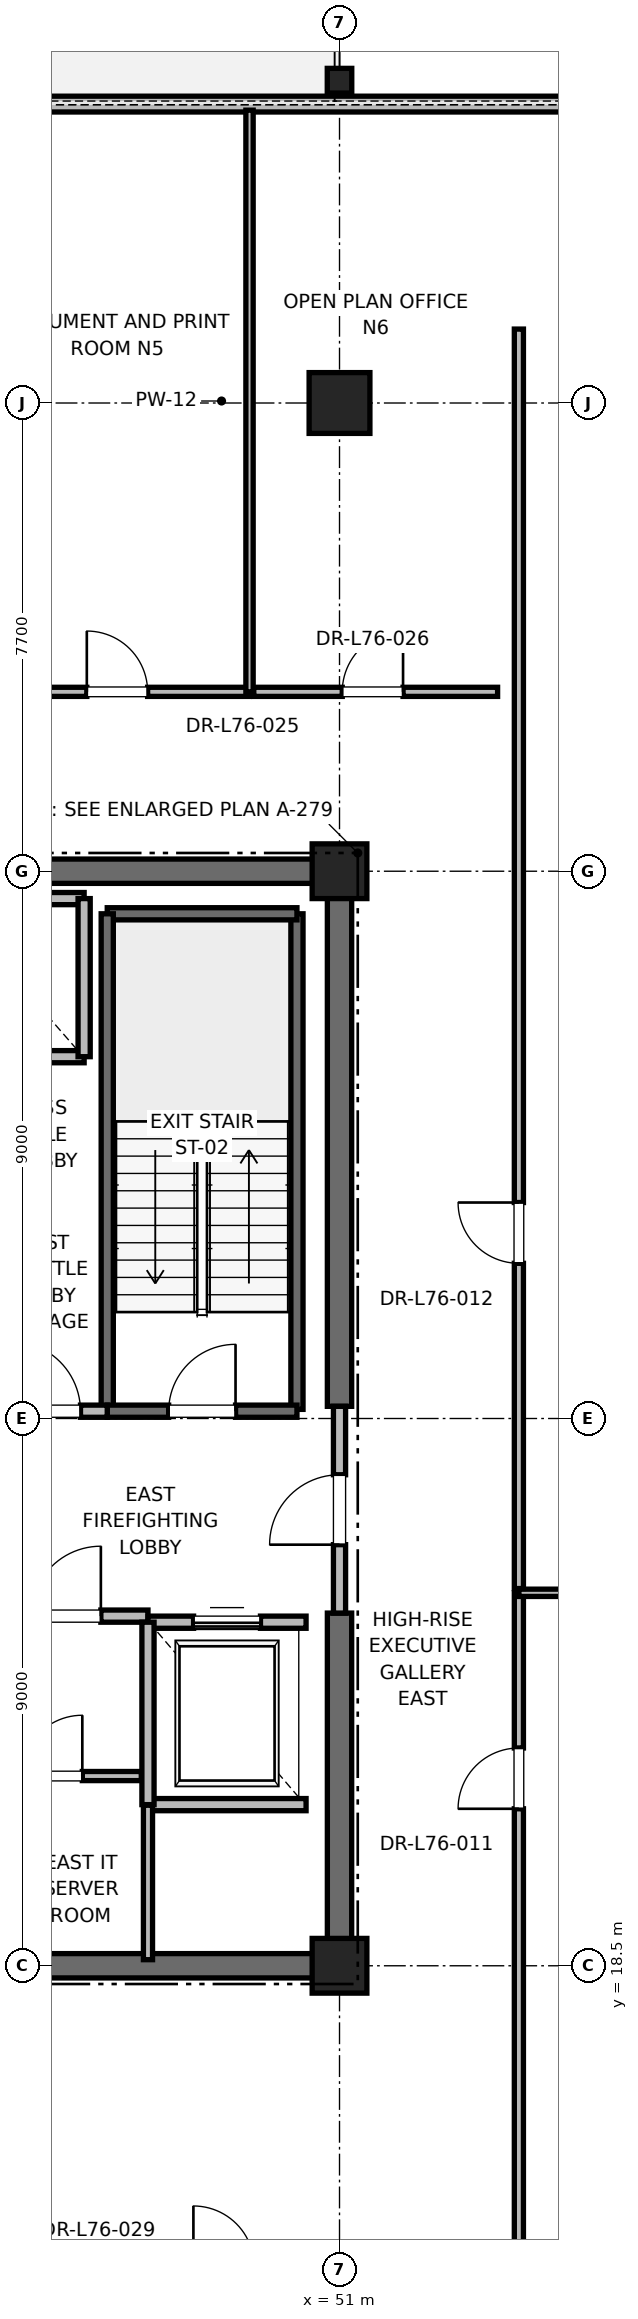
"""IFC4 building model, lengths in metres.
Left out: names, types, materials, properties, quantities, classifications, styles, units other than length and angle.
Written with IfcOpenShell. Run it as: python <this file> out.ifc"""

import sys

from ifc_helpers import new_model, si_unit, direction, frame, frame_2d, origin, origin_2d, place, context, subcontext, project, spatial, rectangle, i_section, extrude, element, fill, save


model = new_model("IFC4")
c1 = context("Model", 3, precision=1e-05, world=origin(), true_north=direction((0.0, 1.0)))
c2 = subcontext(c1, "Body", "Model", "MODEL_VIEW")
j1 = project(units=[si_unit("LENGTHUNIT", "METRE"), si_unit("PLANEANGLEUNIT", "RADIAN")], contexts=[c1])
p1 = place(None, origin())
s1 = spatial("IfcSite", under=j1, at=p1, CompositionType="ELEMENT")
p2 = place(p1, origin())
s2 = spatial("IfcBuilding", under=s1, at=p2, CompositionType="ELEMENT")
p3 = place(p2, frame((0.0, 0.0, 326.8)))
s3 = spatial("IfcBuildingStorey", under=s2, at=p3, CompositionType="ELEMENT", Elevation=326.8)
p4 = place(p3, frame((51.0, 44.2, 0.0), z_axis=(0.0, 0.0, 1.0), x_axis=(1.0, 0.0, 0.0)))
e1 = element("IfcColumn", 1, at=p4, inside=s3, PredefinedType="COLUMN", context=c2, shape_type="SweptSolid", body=[
    extrude(rectangle(XDim=1.0, YDim=1.0, at=origin_2d()), origin(), (0.0, 0.0, 1.0), 4.0),
])
p5 = place(p3, frame((51.0, 49.5, 0.0), z_axis=(0.0, 0.0, 1.0), x_axis=(1.0, 0.0, 0.0)))
e2 = element("IfcColumn", 2, at=p5, inside=s3, PredefinedType="COLUMN", context=c2, shape_type="SweptSolid", body=[
    extrude(i_section(OverallWidth=0.403, OverallDepth=0.406, WebThickness=0.027, FlangeThickness=0.043, FilletRadius=0.015, at=origin_2d()), origin(), (0.0, 0.0, 1.0), 4.0),
])
for number, where, z_axis, x_axis in (
    (3, (51.0, 18.5, 0.0), (0.0, 0.0, 1.0), (1.0, 0.0, 0.0)),
    (4, (51.0, 36.5, 0.0), (0.0, 0.0, 1.0), (1.0, 0.0, 0.0)),
):
    element("IfcColumn", number, at=place(p3, frame(where, z_axis=z_axis, x_axis=x_axis)), inside=s3, PredefinedType="PILASTER", context=c2, shape_type="SweptSolid", body=[
        extrude(rectangle(XDim=0.9, YDim=0.9, at=origin_2d()), origin(), (0.0, 0.0, 1.0), 4.0),
    ])
p6 = place(p3, frame((41.8, 18.5, 0.0), z_axis=(0.0, 0.0, 1.0), x_axis=(1.0, 0.0, 0.0)))
e5 = element("IfcWall", 5, at=p6, inside=s3, PredefinedType="SHEAR", context=c2, shape_type="SweptSolid", body=[
    extrude(rectangle(XDim=9.2, YDim=0.4, at=frame_2d((4.6, 0.0))), origin(), (0.0, 0.0, 1.0), 3.785),
])
for number, where, z_axis, x_axis in (
    (6, (45.2, 36.5, 0.0), (0.0, 0.0, 1.0), (1.0, 0.0, 0.0)),
    (7, (51.0, 18.5, 0.0), (0.0, 0.0, 1.0), (0.0, 1.0, 0.0)),
):
    element("IfcWall", number, at=place(p3, frame(where, z_axis=z_axis, x_axis=x_axis)), inside=s3, PredefinedType="SHEAR", context=c2, shape_type="SweptSolid", body=[
        extrude(rectangle(XDim=5.8, YDim=0.4, at=frame_2d((2.9, 0.0))), origin(), (0.0, 0.0, 1.0), 3.785),
    ])
p7 = place(p3, frame((51.0, 27.7, 0.0), z_axis=(0.0, 0.0, 1.0), x_axis=(0.0, 1.0, 0.0)))
e8 = element("IfcWall", 8, at=p7, inside=s3, PredefinedType="SHEAR", context=c2, shape_type="SweptSolid", body=[
    extrude(rectangle(XDim=8.8, YDim=0.4, at=frame_2d((4.4, 0.0))), origin(), (0.0, 0.0, 1.0), 3.785),
])
p8 = place(p3, frame((61.031, 49.116, 0.0), z_axis=(0.0, 0.0, 1.0), x_axis=(-1.0, 0.0, 0.0)))
e9 = element("IfcWall", 9, at=p8, inside=s3, PredefinedType="PARAPET", context=c2, shape_type="SweptSolid", body=[
    extrude(rectangle(XDim=42.063, YDim=0.26, at=frame_2d((21.031, 0.0))), origin(), (0.0, 0.0, 1.0), 3.196),
])
p9 = place(p8, frame((4.2, 0.0, 0.85)))
e10 = element("IfcOpeningElement", 10, at=p9, cuts=e9, PredefinedType="OPENING", context=c2, shape_type="SweptSolid", body=[
    extrude(rectangle(XDim=1.6, YDim=2.1, at=frame_2d((0.8, 1.05))), frame((0.0, 0.13, 0.0), z_axis=(0.0, -1.0, 0.0), x_axis=(1.0, 0.0, 0.0)), (0.0, 0.0, 1.0), 0.26),
])
p10 = place(p8, frame((20.431, 0.0, 0.0)))
e11 = element("IfcOpeningElement", 11, at=p10, cuts=e9, PredefinedType="OPENING", context=c2, shape_type="SweptSolid", body=[
    extrude(rectangle(XDim=1.2, YDim=2.2, at=frame_2d((0.6, 1.1))), frame((0.0, 0.13, 0.0), z_axis=(0.0, -1.0, 0.0), x_axis=(1.0, 0.0, 0.0)), (0.0, 0.0, 1.0), 0.26),
])
p11 = place(p8, frame((36.263, 0.0, 0.85)))
e12 = element("IfcOpeningElement", 12, at=p11, cuts=e9, PredefinedType="OPENING", context=c2, shape_type="SweptSolid", body=[
    extrude(rectangle(XDim=1.6, YDim=2.1, at=frame_2d((0.8, 1.05))), frame((0.0, 0.13, 0.0), z_axis=(0.0, -1.0, 0.0), x_axis=(1.0, 0.0, 0.0)), (0.0, 0.0, 1.0), 0.26),
])
p12 = place(p3, frame((50.3, 27.65, 0.0), z_axis=(0.0, 0.0, 1.0), x_axis=(0.0, 1.0, 0.0)))
e13 = element("IfcWall", 13, at=p12, inside=s3, PredefinedType="SOLIDWALL", context=c2, shape_type="SweptSolid", body=[
    extrude(rectangle(XDim=8.15, YDim=0.2, at=frame_2d((4.075, 0.0))), origin(), (0.0, 0.0, 1.0), 3.785),
])
p13 = place(p3, frame((47.18, 35.8, 0.0), z_axis=(0.0, 0.0, 1.0), x_axis=(1.0, 0.0, 0.0)))
e14 = element("IfcWall", 14, at=p13, inside=s3, PredefinedType="SOLIDWALL", context=c2, shape_type="SweptSolid", body=[
    extrude(rectangle(XDim=3.12, YDim=0.2, at=frame_2d((1.56, 0.0))), origin(), (0.0, 0.0, 1.0), 3.785),
])
p14 = place(p3, frame((47.18, 27.62, 0.0), z_axis=(0.0, 0.0, 1.0), x_axis=(0.0, 1.0, 0.0)))
e15 = element("IfcWall", 15, at=p14, inside=s3, PredefinedType="SOLIDWALL", context=c2, shape_type="SweptSolid", body=[
    extrude(rectangle(XDim=8.18, YDim=0.2, at=frame_2d((4.09, 0.0))), origin(), (0.0, 0.0, 1.0), 3.785),
])
p15 = place(p3, frame((47.18, 27.62, 0.0), z_axis=(0.0, 0.0, 1.0), x_axis=(1.0, 0.0, 0.0)))
e16 = element("IfcWall", 16, at=p15, inside=s3, PredefinedType="SOLIDWALL", context=c2, shape_type="SweptSolid", body=[
    extrude(rectangle(XDim=3.12, YDim=0.2, at=frame_2d((1.56, 0.0))), origin(), (0.0, 0.0, 1.0), 3.785),
])
p16 = place(p15, frame((1.01, 0.0, 0.0)))
e17 = element("IfcOpeningElement", 17, at=p16, cuts=e16, PredefinedType="OPENING", context=c2, shape_type="SweptSolid", body=[
    extrude(rectangle(XDim=1.1, YDim=2.15, at=frame_2d((0.55, 1.075))), frame((0.0, 0.1, 0.0), z_axis=(0.0, -1.0, 0.0), x_axis=(1.0, 0.0, 0.0)), (0.0, 0.0, 1.0), 0.2),
])
p17 = place(p3, frame((45.15, 24.25, 0.0), z_axis=(0.0, 0.0, 1.0), x_axis=(1.0, 0.0, 0.0)))
e18 = element("IfcWall", 18, at=p17, inside=s3, PredefinedType="PARTITIONING", context=c2, shape_type="SweptSolid", body=[
    extrude(rectangle(XDim=2.7, YDim=0.2, at=frame_2d((1.35, 0.0))), origin(), (0.0, 0.0, 1.0), 3.785),
])
p18 = place(p17, frame((0.775, 0.0, 0.0)))
e19 = element("IfcOpeningElement", 19, at=p18, cuts=e18, PredefinedType="OPENING", context=c2, shape_type="SweptSolid", body=[
    extrude(rectangle(XDim=1.15, YDim=2.2, at=frame_2d((0.575, 1.1))), frame((0.0, 0.1, 0.0), z_axis=(0.0, -1.0, 0.0), x_axis=(1.0, 0.0, 0.0)), (0.0, 0.0, 1.0), 0.2),
])
p19 = place(p3, frame((45.15, 27.62, 0.0), z_axis=(0.0, 0.0, 1.0), x_axis=(1.0, 0.0, 0.0)))
e20 = element("IfcWall", 20, at=p19, inside=s3, PredefinedType="PARTITIONING", context=c2, shape_type="SweptSolid", body=[
    extrude(rectangle(XDim=2.03, YDim=0.2, at=frame_2d((1.015, 0.0))), origin(), (0.0, 0.0, 1.0), 3.785),
])
p20 = place(p19, frame((0.44, 0.0, 0.0)))
e21 = element("IfcOpeningElement", 21, at=p20, cuts=e20, PredefinedType="OPENING", context=c2, shape_type="SweptSolid", body=[
    extrude(rectangle(XDim=1.15, YDim=2.2, at=frame_2d((0.575, 1.1))), frame((0.0, 0.1, 0.0), z_axis=(0.0, -1.0, 0.0), x_axis=(1.0, 0.0, 0.0)), (0.0, 0.0, 1.0), 0.2),
])
p21 = place(p3, frame((51.0, 24.3, 0.0), z_axis=(0.0, 0.0, 1.0), x_axis=(0.0, 1.0, 0.0)))
e22 = element("IfcWall", 22, at=p21, inside=s3, PredefinedType="PARTITIONING", context=c2, shape_type="SweptSolid", body=[
    extrude(rectangle(XDim=3.4, YDim=0.2, at=frame_2d((1.7, 0.0))), origin(), (0.0, 0.0, 1.0), 2.865),
])
p22 = place(p21, frame((1.125, 0.0, 0.0)))
e23 = element("IfcOpeningElement", 23, at=p22, cuts=e22, PredefinedType="OPENING", context=c2, shape_type="SweptSolid", body=[
    extrude(rectangle(XDim=1.15, YDim=2.2, at=frame_2d((0.575, 1.1))), frame((0.0, 0.1, 0.0), z_axis=(0.0, -1.0, 0.0), x_axis=(1.0, 0.0, 0.0)), (0.0, 0.0, 1.0), 0.2),
])
p23 = place(p3, frame((47.85, 21.15, 0.0), z_axis=(0.0, 0.0, 1.0), x_axis=(1.0, 0.0, 0.0)))
e24 = element("IfcWall", 24, at=p23, inside=s3, PredefinedType="SOLIDWALL", context=c2, shape_type="SweptSolid", body=[
    extrude(rectangle(XDim=2.6, YDim=0.2, at=frame_2d((1.3, 0.0))), origin(), (0.0, 0.0, 1.0), 3.785),
])
p24 = place(p3, frame((50.45, 24.15, 0.0), z_axis=(0.0, 0.0, 1.0), x_axis=(-1.0, 0.0, 0.0)))
e25 = element("IfcWall", 25, at=p24, inside=s3, PredefinedType="SOLIDWALL", context=c2, shape_type="SweptSolid", body=[
    extrude(rectangle(XDim=2.6, YDim=0.2, at=frame_2d((1.3, 0.0))), origin(), (0.0, 0.0, 1.0), 2.865),
])
p25 = place(p24, frame((0.75, 0.0, 0.0)))
e26 = element("IfcOpeningElement", 26, at=p25, cuts=e25, PredefinedType="OPENING", context=c2, shape_type="SweptSolid", body=[
    extrude(rectangle(XDim=1.1, YDim=2.2, at=frame_2d((0.55, 1.1))), frame((0.0, 0.1, 0.0), z_axis=(0.0, -1.0, 0.0), x_axis=(1.0, 0.0, 0.0)), (0.0, 0.0, 1.0), 0.2),
])
p26 = place(p3, frame((47.85, 24.15, 0.0), z_axis=(0.0, 0.0, 1.0), x_axis=(0.0, -1.0, 0.0)))
e27 = element("IfcWall", 27, at=p26, inside=s3, PredefinedType="SOLIDWALL", context=c2, shape_type="SweptSolid", body=[
    extrude(rectangle(XDim=3.0, YDim=0.2, at=frame_2d((1.5, 0.0))), origin(), (0.0, 0.0, 1.0), 3.785),
])
p27 = place(p3, frame((44.5, 33.45, 0.0), z_axis=(0.0, 0.0, 1.0), x_axis=(1.0, 0.0, 0.0)))
e28 = element("IfcWall", 28, at=p27, inside=s3, PredefinedType="SOLIDWALL", context=c2, shape_type="SweptSolid", body=[
    extrude(rectangle(XDim=2.3, YDim=0.2, at=frame_2d((1.15, 0.0))), origin(), (0.0, 0.0, 1.0), 3.785),
])
p28 = place(p3, frame((46.8, 36.05, 0.0), z_axis=(0.0, 0.0, 1.0), x_axis=(-1.0, 0.0, 0.0)))
e29 = element("IfcWall", 29, at=p28, inside=s3, PredefinedType="SOLIDWALL", context=c2, shape_type="SweptSolid", body=[
    extrude(rectangle(XDim=2.3, YDim=0.2, at=frame_2d((1.15, 0.0))), origin(), (0.0, 0.0, 1.0), 2.865),
])
p29 = place(p3, frame((46.8, 33.45, 0.0), z_axis=(0.0, 0.0, 1.0), x_axis=(0.0, 1.0, 0.0)))
e30 = element("IfcWall", 30, at=p29, inside=s3, PredefinedType="SOLIDWALL", context=c2, shape_type="SweptSolid", body=[
    extrude(rectangle(XDim=2.6, YDim=0.2, at=frame_2d((1.3, 0.0))), origin(), (0.0, 0.0, 1.0), 3.785),
])
p30 = place(p3, frame((47.85, 18.6, 0.0), z_axis=(0.0, 0.0, 1.0), x_axis=(0.0, 1.0, 0.0)))
e31 = element("IfcWall", 31, at=p30, inside=s3, PredefinedType="PARTITIONING", context=c2, shape_type="SweptSolid", body=[
    extrude(rectangle(XDim=2.54, YDim=0.15, at=frame_2d((1.27, 0.0))), origin(), (0.0, 0.0, 1.0), 2.85),
])
p31 = place(p3, frame((44.8, 21.62, 0.0), z_axis=(0.0, 0.0, 1.0), x_axis=(1.0, 0.0, 0.0)))
e32 = element("IfcWall", 32, at=p31, inside=s3, PredefinedType="PARTITIONING", context=c2, shape_type="SweptSolid", body=[
    extrude(rectangle(XDim=2.94, YDim=0.15, at=frame_2d((1.47, 0.0))), origin(), (0.0, 0.0, 1.0), 2.85),
])
p32 = place(p31, frame((0.97, 0.0, 0.0)))
e33 = element("IfcOpeningElement", 33, at=p32, cuts=e32, PredefinedType="OPENING", context=c2, shape_type="SweptSolid", body=[
    extrude(rectangle(XDim=1.0, YDim=2.15, at=frame_2d((0.5, 1.075))), frame((0.0, 0.075, 0.0), z_axis=(0.0, -1.0, 0.0), x_axis=(1.0, 0.0, 0.0)), (0.0, 0.0, 1.0), 0.15),
])
p33 = place(p3, frame((45.238, 39.45, 0.0), z_axis=(0.0, 0.0, 1.0), x_axis=(1.0, 0.0, 0.0)))
e34 = element("IfcWall", 34, at=p33, inside=s3, PredefinedType="PARTITIONING", context=c2, shape_type="SweptSolid", body=[
    extrude(rectangle(XDim=4.282, YDim=0.15, at=frame_2d((2.141, 0.0))), origin(), (0.0, 0.0, 1.0), 2.85),
])
p34 = place(p33, frame((1.606, 0.0, 0.0)))
e35 = element("IfcOpeningElement", 35, at=p34, cuts=e34, PredefinedType="OPENING", context=c2, shape_type="SweptSolid", body=[
    extrude(rectangle(XDim=1.0, YDim=2.15, at=frame_2d((0.5, 1.075))), frame((0.0, 0.075, 0.0), z_axis=(0.0, -1.0, 0.0), x_axis=(1.0, 0.0, 0.0)), (0.0, 0.0, 1.0), 0.15),
])
p35 = place(p3, frame((49.52, 39.45, 0.0), z_axis=(0.0, 0.0, 1.0), x_axis=(0.0, 1.0, 0.0)))
e36 = element("IfcWall", 36, at=p35, inside=s3, PredefinedType="PARTITIONING", context=c2, shape_type="SweptSolid", body=[
    extrude(rectangle(XDim=9.566, YDim=0.12, at=frame_2d((4.783, 0.0))), origin(), (0.0, 0.0, 1.0), 2.415),
])
p36 = place(p3, frame((49.59, 39.45, 0.0), z_axis=(0.0, 0.0, 1.0), x_axis=(1.0, 0.0, 0.0)))
e37 = element("IfcWall", 37, at=p36, inside=s3, PredefinedType="PARTITIONING", context=c2, shape_type="SweptSolid", body=[
    extrude(rectangle(XDim=4.01, YDim=0.15, at=frame_2d((2.005, 0.0))), origin(), (0.0, 0.0, 1.0), 2.85),
])
p37 = place(p36, frame((1.455, 0.0, 0.0)))
e38 = element("IfcOpeningElement", 38, at=p37, cuts=e37, PredefinedType="OPENING", context=c2, shape_type="SweptSolid", body=[
    extrude(rectangle(XDim=1.0, YDim=2.15, at=frame_2d((0.5, 1.075))), frame((0.0, 0.075, 0.0), z_axis=(0.0, -1.0, 0.0), x_axis=(1.0, 0.0, 0.0)), (0.0, 0.0, 1.0), 0.15),
])
p38 = place(p3, frame((53.95, 9.584, 0.0), z_axis=(0.0, 0.0, 1.0), x_axis=(0.0, 1.0, 0.0)))
e39 = element("IfcWall", 39, at=p38, inside=s3, PredefinedType="PARTITIONING", context=c2, shape_type="SweptSolid", body=[
    extrude(rectangle(XDim=15.049, YDim=0.15, at=frame_2d((7.525, 0.0))), origin(), (0.0, 0.0, 1.0), 2.85),
])
p39 = place(p38, frame((11.497, 0.0, 0.0)))
e40 = element("IfcOpeningElement", 40, at=p39, cuts=e39, PredefinedType="OPENING", context=c2, shape_type="SweptSolid", body=[
    extrude(rectangle(XDim=1.0, YDim=2.15, at=frame_2d((0.5, 1.075))), frame((0.0, 0.075, 0.0), z_axis=(0.0, -1.0, 0.0), x_axis=(1.0, 0.0, 0.0)), (0.0, 0.0, 1.0), 0.15),
])
p40 = place(p3, frame((53.95, 24.634, 0.0), z_axis=(0.0, 0.0, 1.0), x_axis=(1.0, 0.0, 0.0)))
e41 = element("IfcWall", 41, at=p40, inside=s3, PredefinedType="PARTITIONING", context=c2, shape_type="SweptSolid", body=[
    extrude(rectangle(XDim=10.781, YDim=0.12, at=frame_2d((5.391, 0.0))), origin(), (0.0, 0.0, 1.0), 2.85),
])
p41 = place(p3, frame((53.95, 24.704, 0.0), z_axis=(0.0, 0.0, 1.0), x_axis=(0.0, 1.0, 0.0)))
e42 = element("IfcWall", 42, at=p41, inside=s3, PredefinedType="PARTITIONING", context=c2, shape_type="SweptSolid", body=[
    extrude(rectangle(XDim=20.712, YDim=0.15, at=frame_2d((10.356, 0.0))), origin(), (0.0, 0.0, 1.0), 2.85),
])
p42 = place(p41, frame((5.348, 0.0, 0.0)))
e43 = element("IfcOpeningElement", 43, at=p42, cuts=e42, PredefinedType="OPENING", context=c2, shape_type="SweptSolid", body=[
    extrude(rectangle(XDim=1.0, YDim=2.15, at=frame_2d((0.5, 1.075))), frame((0.0, 0.075, 0.0), z_axis=(0.0, -1.0, 0.0), x_axis=(1.0, 0.0, 0.0)), (0.0, 0.0, 1.0), 0.15),
])
p43 = place(p16, origin())
e44 = element("IfcDoor", 44, at=p43, inside=s3, OperationType="SINGLE_SWING_RIGHT", PredefinedType="DOOR", context=c2, shape_type="SweptSolid", body=[
    extrude(rectangle(XDim=1.1, YDim=2.15, at=frame_2d((0.55, 1.075))), frame((0.0, 0.025, 0.0), z_axis=(0.0, -1.0, 0.0), x_axis=(1.0, 0.0, 0.0)), (0.0, 0.0, 1.0), 0.05),
])
fill(e17, e44)
p44 = place(p18, origin())
e45 = element("IfcDoor", 45, at=p44, inside=s3, OperationType="SINGLE_SWING_RIGHT", PredefinedType="DOOR", context=c2, shape_type="SweptSolid", body=[
    extrude(rectangle(XDim=1.15, YDim=2.2, at=frame_2d((0.575, 1.1))), frame((0.0, 0.025, 0.0), z_axis=(0.0, -1.0, 0.0), x_axis=(1.0, 0.0, 0.0)), (0.0, 0.0, 1.0), 0.05),
])
fill(e19, e45)
p45 = place(p20, origin())
e46 = element("IfcDoor", 46, at=p45, inside=s3, OperationType="SINGLE_SWING_LEFT", PredefinedType="DOOR", context=c2, shape_type="SweptSolid", body=[
    extrude(rectangle(XDim=1.15, YDim=2.2, at=frame_2d((0.575, 1.1))), frame((0.0, 0.025, 0.0), z_axis=(0.0, -1.0, 0.0), x_axis=(1.0, 0.0, 0.0)), (0.0, 0.0, 1.0), 0.05),
])
fill(e21, e46)
p46 = place(p22, origin())
e47 = element("IfcDoor", 47, at=p46, inside=s3, OperationType="SINGLE_SWING_LEFT", PredefinedType="DOOR", context=c2, shape_type="SweptSolid", body=[
    extrude(rectangle(XDim=1.15, YDim=2.2, at=frame_2d((0.575, 1.1))), frame((0.0, 0.025, 0.0), z_axis=(0.0, -1.0, 0.0), x_axis=(1.0, 0.0, 0.0)), (0.0, 0.0, 1.0), 0.05),
])
fill(e23, e47)
p47 = place(p25, origin())
e48 = element("IfcDoor", 48, at=p47, inside=s3, OperationType="SLIDING_TO_RIGHT", PredefinedType="DOOR", context=c2, shape_type="SweptSolid", body=[
    extrude(rectangle(XDim=1.1, YDim=2.2, at=frame_2d((0.55, 1.1))), frame((0.0, 0.025, 0.0), z_axis=(0.0, -1.0, 0.0), x_axis=(1.0, 0.0, 0.0)), (0.0, 0.0, 1.0), 0.05),
])
fill(e26, e48)
p48 = place(p32, origin())
e49 = element("IfcDoor", 49, at=p48, inside=s3, OperationType="SINGLE_SWING_RIGHT", PredefinedType="DOOR", context=c2, shape_type="SweptSolid", body=[
    extrude(rectangle(XDim=1.0, YDim=2.15, at=frame_2d((0.5, 1.075))), frame((0.0, 0.025, 0.0), z_axis=(0.0, -1.0, 0.0), x_axis=(1.0, 0.0, 0.0)), (0.0, 0.0, 1.0), 0.05),
])
fill(e33, e49)
p49 = place(p34, origin())
e50 = element("IfcDoor", 50, at=p49, inside=s3, OperationType="SINGLE_SWING_LEFT", PredefinedType="DOOR", context=c2, shape_type="SweptSolid", body=[
    extrude(rectangle(XDim=1.0, YDim=2.15, at=frame_2d((0.5, 1.075))), frame((0.0, 0.025, 0.0), z_axis=(0.0, -1.0, 0.0), x_axis=(1.0, 0.0, 0.0)), (0.0, 0.0, 1.0), 0.05),
])
fill(e35, e50)
p50 = place(p37, origin())
e51 = element("IfcDoor", 51, at=p50, inside=s3, OperationType="SINGLE_SWING_RIGHT", PredefinedType="DOOR", context=c2, shape_type="SweptSolid", body=[
    extrude(rectangle(XDim=1.0, YDim=2.15, at=frame_2d((0.5, 1.075))), frame((0.0, 0.025, 0.0), z_axis=(0.0, -1.0, 0.0), x_axis=(1.0, 0.0, 0.0)), (0.0, 0.0, 1.0), 0.05),
])
fill(e38, e51)
p51 = place(p39, origin())
e52 = element("IfcDoor", 52, at=p51, inside=s3, OperationType="SINGLE_SWING_LEFT", PredefinedType="DOOR", context=c2, shape_type="SweptSolid", body=[
    extrude(rectangle(XDim=1.0, YDim=2.15, at=frame_2d((0.5, 1.075))), frame((0.0, 0.025, 0.0), z_axis=(0.0, -1.0, 0.0), x_axis=(1.0, 0.0, 0.0)), (0.0, 0.0, 1.0), 0.05),
])
fill(e40, e52)
p52 = place(p42, origin())
e53 = element("IfcDoor", 53, at=p52, inside=s3, OperationType="SINGLE_SWING_RIGHT", PredefinedType="DOOR", context=c2, shape_type="SweptSolid", body=[
    extrude(rectangle(XDim=1.0, YDim=2.15, at=frame_2d((0.5, 1.075))), frame((0.0, 0.025, 0.0), z_axis=(0.0, -1.0, 0.0), x_axis=(1.0, 0.0, 0.0)), (0.0, 0.0, 1.0), 0.05),
])
fill(e43, e53)
save(model, sys.argv[1])
